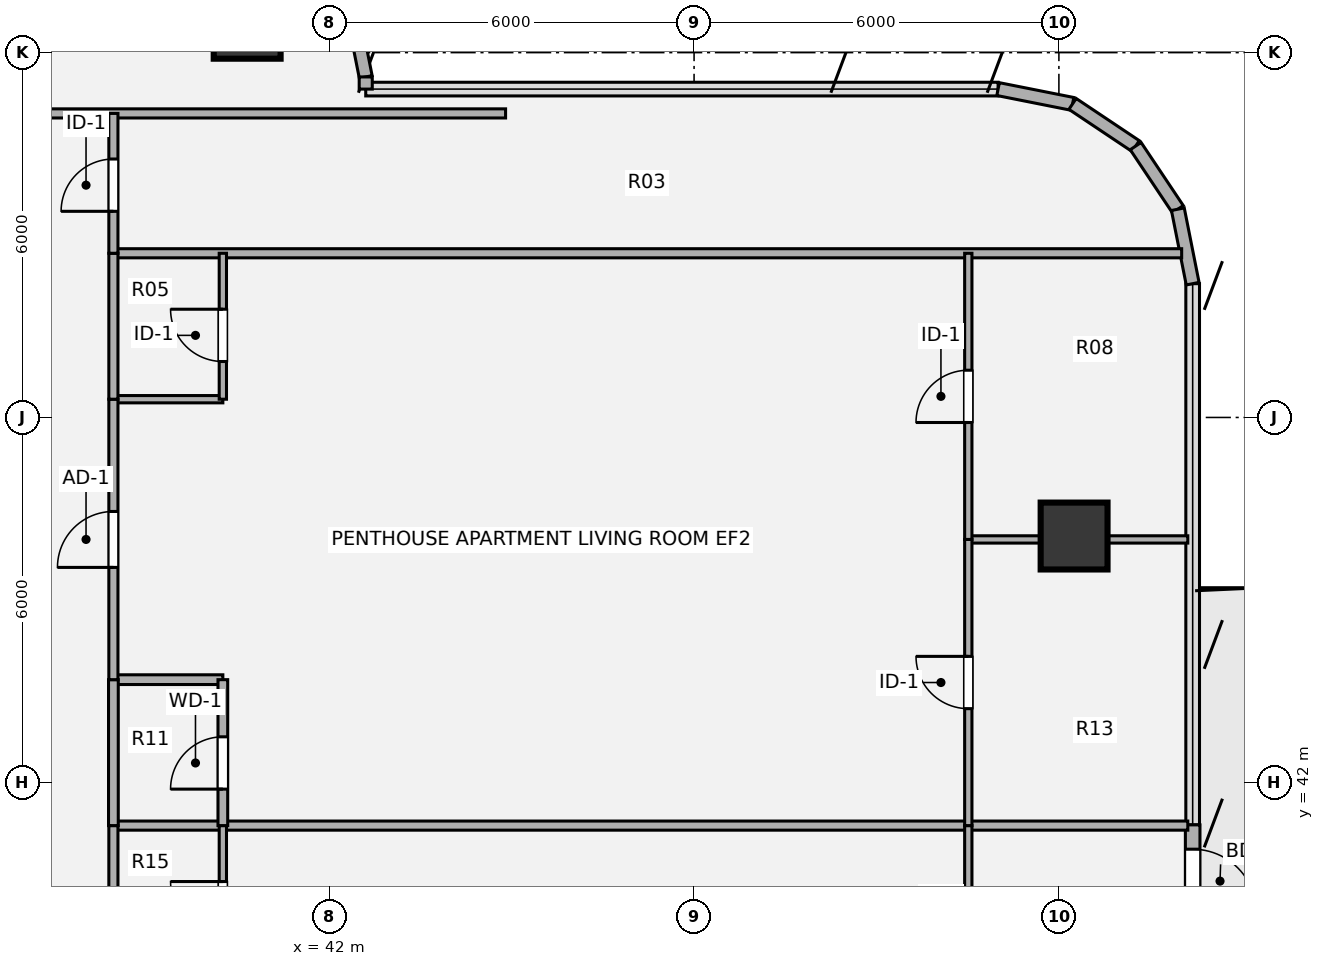
"""IFC4 building model, lengths in metres.
Left out: names, types, materials, properties, quantities, classifications, styles, units other than length and angle.
Written with IfcOpenShell. Run it as: python <this file> out.ifc"""

import sys

from ifc_helpers import new_model, si_unit, direction, frame, frame_2d, origin, origin_2d, place, context, subcontext, project, spatial, rectangle, hollow_circle, extrude, source, transform, mapped, element, fill, save


model = new_model("IFC4")
c1 = context("Model", 3, precision=1e-05, world=origin(), true_north=direction((0.0, 1.0)))
c2 = subcontext(c1, "Body", "Model", "MODEL_VIEW")
j1 = project(units=[si_unit("LENGTHUNIT", "METRE"), si_unit("PLANEANGLEUNIT", "RADIAN")], contexts=[c1])
p1 = place(None, origin())
s1 = spatial("IfcSite", under=j1, at=p1, CompositionType="ELEMENT")
p2 = place(p1, origin())
s2 = spatial("IfcBuilding", under=s1, at=p2, CompositionType="ELEMENT")
p3 = place(p2, frame((0.0, 0.0, 160.2)))
s3 = spatial("IfcBuildingStorey", under=s2, at=p3, CompositionType="ELEMENT", Elevation=160.2)
m1 = source(origin(), c2, "Body", "SweptSolid", [
    extrude(hollow_circle(Radius=0.55, WallThickness=0.04, at=origin_2d()), origin(), (0.0, 0.0, 1.0), 3.78),
])
for number, where, z_axis, x_axis in (
    (1, (54.25, 46.05, 0.0), (0.0, 0.0, 1.0), (1.0, 0.0, 0.0)),
    (2, (40.65, 54.45, 0.0), (0.0, 0.0, 1.0), (1.0, 0.0, 0.0)),
):
    element("IfcColumn", number, at=place(p3, frame(where, z_axis=z_axis, x_axis=x_axis)), inside=s3, PredefinedType="COLUMN", context=c2, shape_type="MappedRepresentation", body=[
        mapped(m1, transform((0.0, 0.0, 0.0), x_axis=(1.0, 0.0, 0.0), y_axis=(0.0, 1.0, 0.0), z_axis=(0.0, 0.0, 1.0), scale=1.0)),
    ])
p4 = place(p3, frame((42.387, 54.671, 0.0), z_axis=(0.0, 0.0, 1.0), x_axis=(0.195127417394, -0.980777900945, 0.0)))
e3 = element("IfcWall", 3, at=p4, inside=s3, PredefinedType="SOLIDWALL", context=c2, shape_type="SweptSolid", body=[
    extrude(rectangle(XDim=1.092, YDim=0.215, at=frame_2d((0.546, 0.0))), origin(), (0.0, 0.0, 1.0), 3.53),
])
p5 = place(p3, frame((42.6, 53.6, 0.0), z_axis=(0.0, 0.0, 1.0), x_axis=(0.0, -1.0, 0.0)))
e4 = element("IfcWall", 4, at=p5, inside=s3, PredefinedType="SOLIDWALL", context=c2, shape_type="SweptSolid", body=[
    extrude(rectangle(XDim=0.2, YDim=0.215, at=frame_2d((0.1, 0.0))), origin(), (0.0, 0.0, 1.0), 3.53),
])
for number, where, z_axis, x_axis in (
    (5, (53.0, 53.4, 0.0), (0.0, 0.0, 1.0), (0.981, -0.195, 0.0)),
    (6, (54.225, 53.156, 0.0), (0.0, 0.0, 1.0), (0.831, -0.556, 0.0)),
    (7, (55.263, 52.463, 0.0), (0.0, 0.0, 1.0), (0.556, -0.831, 0.0)),
    (8, (55.956, 51.425, 0.0), (0.0, 0.0, 1.0), (0.195, -0.981, 0.0)),
):
    element("IfcWall", number, at=place(p3, frame(where, z_axis=z_axis, x_axis=x_axis)), inside=s3, PredefinedType="SOLIDWALL", context=c2, shape_type="SweptSolid", body=[
        extrude(rectangle(XDim=1.249, YDim=0.215, at=frame_2d((0.624, 0.0))), origin(), (0.0, 0.0, 1.0), 3.53),
    ])
p6 = place(p3, frame((56.2, 41.3, 0.0), z_axis=(0.0, 0.0, 1.0), x_axis=(0.0, -1.0, 0.0)))
e9 = element("IfcWall", 9, at=p6, inside=s3, PredefinedType="SOLIDWALL", context=c2, shape_type="SweptSolid", body=[
    extrude(rectangle(XDim=3.6, YDim=0.24, at=frame_2d((1.8, 0.0))), origin(), (0.0, 0.0, 1.0), 3.53),
])
p7 = place(p6, frame((0.4, 0.0, 0.0)))
e10 = element("IfcOpeningElement", 10, at=p7, cuts=e9, PredefinedType="OPENING", context=c2, shape_type="SweptSolid", body=[
    extrude(rectangle(XDim=1.05, YDim=2.15, at=origin_2d()), frame((0.525, 0.13, 1.075), z_axis=(0.0, -1.0, 0.0), x_axis=(1.0, 0.0, 0.0)), (0.0, 0.0, 1.0), 0.26),
])
p8 = place(p6, frame((1.85, 0.0, 0.85)))
e11 = element("IfcOpeningElement", 11, at=p8, cuts=e9, PredefinedType="OPENING", context=c2, shape_type="SweptSolid", body=[
    extrude(rectangle(XDim=1.35, YDim=1.35, at=origin_2d()), frame((0.675, 0.13, 0.675), z_axis=(0.0, -1.0, 0.0), x_axis=(1.0, 0.0, 0.0)), (0.0, 0.0, 1.0), 0.26),
])
p9 = place(p3, frame((38.45, 41.288, 0.0), z_axis=(0.0, 0.0, 1.0), x_axis=(1.0, 0.0, 0.0)))
e12 = element("IfcWall", 12, at=p9, inside=s3, PredefinedType="PARTITIONING", context=c2, shape_type="SweptSolid", body=[
    extrude(rectangle(XDim=17.67, YDim=0.15, at=frame_2d((8.835, 0.0))), origin(), (0.0, 0.0, 1.0), 2.982),
])
p10 = place(p3, frame((38.45, 43.688, 0.0), z_axis=(0.0, 0.0, 1.0), x_axis=(1.0, 0.0, 0.0)))
e13 = element("IfcWall", 13, at=p10, inside=s3, PredefinedType="PLUMBINGWALL", context=c2, shape_type="SweptSolid", body=[
    extrude(rectangle(XDim=1.8, YDim=0.16, at=frame_2d((0.9, 0.0))), origin(), (0.0, 0.0, 1.0), 3.259),
])
p11 = place(p3, frame((52.51, 45.994, 0.0), z_axis=(0.0, 0.0, 1.0), x_axis=(1.0, 0.0, 0.0)))
e14 = element("IfcWall", 14, at=p11, inside=s3, PredefinedType="PARTITIONING", context=c2, shape_type="SweptSolid", body=[
    extrude(rectangle(XDim=3.61, YDim=0.12, at=frame_2d((1.805, 0.0))), origin(), (0.0, 0.0, 1.0), 2.903),
])
p12 = place(p3, frame((38.45, 48.3, 0.0), z_axis=(0.0, 0.0, 1.0), x_axis=(1.0, 0.0, 0.0)))
e15 = element("IfcWall", 15, at=p12, inside=s3, PredefinedType="PARTITIONING", context=c2, shape_type="SweptSolid", body=[
    extrude(rectangle(XDim=1.8, YDim=0.12, at=frame_2d((0.9, 0.0))), origin(), (0.0, 0.0, 1.0), 3.259),
])
p13 = place(p3, frame((38.45, 50.7, 0.0), z_axis=(0.0, 0.0, 1.0), x_axis=(1.0, 0.0, 0.0)))
e16 = element("IfcWall", 16, at=p13, inside=s3, PredefinedType="PARTITIONING", context=c2, shape_type="SweptSolid", body=[
    extrude(rectangle(XDim=17.569, YDim=0.15, at=frame_2d((8.785, 0.0))), origin(), (0.0, 0.0, 1.0), 3.308),
])
p14 = place(p3, frame((27.1, 53.0, 0.0), z_axis=(0.0, 0.0, 1.0), x_axis=(1.0, 0.0, 0.0)))
e17 = element("IfcWall", 17, at=p14, inside=s3, PredefinedType="PARTITIONING", context=c2, shape_type="SweptSolid", body=[
    extrude(rectangle(XDim=17.8, YDim=0.15, at=frame_2d((8.9, 0.0))), origin(), (0.0, 0.0, 1.0), 3.308),
])
p15 = place(p14, frame((8.375, 0.0, 0.0)))
e18 = element("IfcOpeningElement", 18, at=p15, cuts=e17, PredefinedType="OPENING", context=c2, shape_type="SweptSolid", body=[
    extrude(rectangle(XDim=1.05, YDim=2.1, at=origin_2d()), frame((0.525, 0.085, 1.05), z_axis=(0.0, -1.0, 0.0), x_axis=(1.0, 0.0, 0.0)), (0.0, 0.0, 1.0), 0.17),
])
p16 = place(p3, frame((38.45, 38.888, 0.0), z_axis=(0.0, 0.0, 1.0), x_axis=(0.0, 1.0, 0.0)))
e19 = element("IfcWall", 19, at=p16, inside=s3, PredefinedType="PARTITIONING", context=c2, shape_type="SweptSolid", body=[
    extrude(rectangle(XDim=2.4, YDim=0.15, at=frame_2d((1.2, 0.0))), origin(), (0.0, 0.0, 1.0), 3.5),
])
p17 = place(p3, frame((38.45, 41.288, 0.0), z_axis=(0.0, 0.0, 1.0), x_axis=(0.0, 1.0, 0.0)))
e20 = element("IfcWall", 20, at=p17, inside=s3, PredefinedType="PLUMBINGWALL", context=c2, shape_type="SweptSolid", body=[
    extrude(rectangle(XDim=2.4, YDim=0.16, at=frame_2d((1.2, 0.0))), origin(), (0.0, 0.0, 1.0), 3.5),
])
p18 = place(p3, frame((38.45, 43.688, 0.0), z_axis=(0.0, 0.0, 1.0), x_axis=(0.0, 1.0, 0.0)))
e21 = element("IfcWall", 21, at=p18, inside=s3, PredefinedType="PARTITIONING", context=c2, shape_type="SweptSolid", body=[
    extrude(rectangle(XDim=4.612, YDim=0.15, at=frame_2d((2.306, 0.0))), origin(), (0.0, 0.0, 1.0), 3.5),
])
p19 = place(p18, frame((1.846, 0.0, 0.0)))
e22 = element("IfcOpeningElement", 22, at=p19, cuts=e21, PredefinedType="OPENING", context=c2, shape_type="SweptSolid", body=[
    extrude(rectangle(XDim=0.92, YDim=2.1, at=origin_2d()), frame((0.46, 0.085, 1.05), z_axis=(0.0, -1.0, 0.0), x_axis=(1.0, 0.0, 0.0)), (0.0, 0.0, 1.0), 0.17),
])
p20 = place(p3, frame((38.45, 48.3, 0.0), z_axis=(0.0, 0.0, 1.0), x_axis=(0.0, 1.0, 0.0)))
e23 = element("IfcWall", 23, at=p20, inside=s3, PredefinedType="PARTITIONING", context=c2, shape_type="SweptSolid", body=[
    extrude(rectangle(XDim=2.4, YDim=0.15, at=frame_2d((1.2, 0.0))), origin(), (0.0, 0.0, 1.0), 3.5),
])
p21 = place(p3, frame((38.45, 50.7, 0.0), z_axis=(0.0, 0.0, 1.0), x_axis=(0.0, 1.0, 0.0)))
e24 = element("IfcWall", 24, at=p21, inside=s3, PredefinedType="PARTITIONING", context=c2, shape_type="SweptSolid", body=[
    extrude(rectangle(XDim=2.3, YDim=0.15, at=frame_2d((1.15, 0.0))), origin(), (0.0, 0.0, 1.0), 3.5),
])
p22 = place(p21, frame((0.69, 0.0, 0.0)))
e25 = element("IfcOpeningElement", 25, at=p22, cuts=e24, PredefinedType="OPENING", context=c2, shape_type="SweptSolid", body=[
    extrude(rectangle(XDim=0.86, YDim=2.1, at=origin_2d()), frame((0.43, 0.085, 1.05), z_axis=(0.0, -1.0, 0.0), x_axis=(1.0, 0.0, 0.0)), (0.0, 0.0, 1.0), 0.17),
])
p23 = place(p3, frame((40.25, 38.888, 0.0), z_axis=(0.0, 0.0, 1.0), x_axis=(0.0, 1.0, 0.0)))
e26 = element("IfcWall", 26, at=p23, inside=s3, PredefinedType="PARTITIONING", context=c2, shape_type="SweptSolid", body=[
    extrude(rectangle(XDim=2.4, YDim=0.12, at=frame_2d((1.2, 0.0))), origin(), (0.0, 0.0, 1.0), 3.5),
])
p24 = place(p23, frame((0.62, 0.0, 0.0)))
e27 = element("IfcOpeningElement", 27, at=p24, cuts=e26, PredefinedType="OPENING", context=c2, shape_type="SweptSolid", body=[
    extrude(rectangle(XDim=0.86, YDim=2.1, at=origin_2d()), frame((0.43, 0.07, 1.05), z_axis=(0.0, -1.0, 0.0), x_axis=(1.0, 0.0, 0.0)), (0.0, 0.0, 1.0), 0.14),
])
p25 = place(p3, frame((40.25, 41.288, 0.0), z_axis=(0.0, 0.0, 1.0), x_axis=(0.0, 1.0, 0.0)))
e28 = element("IfcWall", 28, at=p25, inside=s3, PredefinedType="PLUMBINGWALL", context=c2, shape_type="SweptSolid", body=[
    extrude(rectangle(XDim=2.4, YDim=0.16, at=frame_2d((1.2, 0.0))), origin(), (0.0, 0.0, 1.0), 3.5),
])
p26 = place(p25, frame((0.6, 0.0, 0.0)))
e29 = element("IfcOpeningElement", 29, at=p26, cuts=e28, PredefinedType="OPENING", context=c2, shape_type="SweptSolid", body=[
    extrude(rectangle(XDim=0.86, YDim=2.1, at=origin_2d()), frame((0.43, 0.09, 1.05), z_axis=(0.0, -1.0, 0.0), x_axis=(1.0, 0.0, 0.0)), (0.0, 0.0, 1.0), 0.18),
])
p27 = place(p3, frame((40.25, 48.3, 0.0), z_axis=(0.0, 0.0, 1.0), x_axis=(0.0, 1.0, 0.0)))
e30 = element("IfcWall", 30, at=p27, inside=s3, PredefinedType="PARTITIONING", context=c2, shape_type="SweptSolid", body=[
    extrude(rectangle(XDim=2.4, YDim=0.12, at=frame_2d((1.2, 0.0))), origin(), (0.0, 0.0, 1.0), 3.5),
])
p28 = place(p27, frame((0.62, 0.0, 0.0)))
e31 = element("IfcOpeningElement", 31, at=p28, cuts=e30, PredefinedType="OPENING", context=c2, shape_type="SweptSolid", body=[
    extrude(rectangle(XDim=0.86, YDim=2.1, at=origin_2d()), frame((0.43, 0.07, 1.05), z_axis=(0.0, -1.0, 0.0), x_axis=(1.0, 0.0, 0.0)), (0.0, 0.0, 1.0), 0.14),
])
p29 = place(p3, frame((52.51, 36.944, 0.0), z_axis=(0.0, 0.0, 1.0), x_axis=(0.0, 1.0, 0.0)))
e32 = element("IfcWall", 32, at=p29, inside=s3, PredefinedType="PARTITIONING", context=c2, shape_type="SweptSolid", body=[
    extrude(rectangle(XDim=4.344, YDim=0.12, at=frame_2d((2.172, 0.0))), origin(), (0.0, 0.0, 1.0), 3.5),
])
p30 = place(p29, frame((1.742, 0.0, 0.0)))
e33 = element("IfcOpeningElement", 33, at=p30, cuts=e32, PredefinedType="OPENING", context=c2, shape_type="SweptSolid", body=[
    extrude(rectangle(XDim=0.86, YDim=2.1, at=origin_2d()), frame((0.43, 0.07, 1.05), z_axis=(0.0, -1.0, 0.0), x_axis=(1.0, 0.0, 0.0)), (0.0, 0.0, 1.0), 0.14),
])
p31 = place(p3, frame((52.51, 41.288, 0.0), z_axis=(0.0, 0.0, 1.0), x_axis=(0.0, 1.0, 0.0)))
e34 = element("IfcWall", 34, at=p31, inside=s3, PredefinedType="PARTITIONING", context=c2, shape_type="SweptSolid", body=[
    extrude(rectangle(XDim=4.706, YDim=0.12, at=frame_2d((2.353, 0.0))), origin(), (0.0, 0.0, 1.0), 3.5),
])
p32 = place(p31, frame((1.923, 0.0, 0.0)))
e35 = element("IfcOpeningElement", 35, at=p32, cuts=e34, PredefinedType="OPENING", context=c2, shape_type="SweptSolid", body=[
    extrude(rectangle(XDim=0.86, YDim=2.1, at=origin_2d()), frame((0.43, 0.07, 1.05), z_axis=(0.0, -1.0, 0.0), x_axis=(1.0, 0.0, 0.0)), (0.0, 0.0, 1.0), 0.14),
])
p33 = place(p3, frame((52.51, 45.994, 0.0), z_axis=(0.0, 0.0, 1.0), x_axis=(0.0, 1.0, 0.0)))
e36 = element("IfcWall", 36, at=p33, inside=s3, PredefinedType="PARTITIONING", context=c2, shape_type="SweptSolid", body=[
    extrude(rectangle(XDim=4.706, YDim=0.12, at=frame_2d((2.353, 0.0))), origin(), (0.0, 0.0, 1.0), 3.5),
])
p34 = place(p33, frame((1.923, 0.0, 0.0)))
e37 = element("IfcOpeningElement", 37, at=p34, cuts=e36, PredefinedType="OPENING", context=c2, shape_type="SweptSolid", body=[
    extrude(rectangle(XDim=0.86, YDim=2.1, at=origin_2d()), frame((0.43, 0.07, 1.05), z_axis=(0.0, -1.0, 0.0), x_axis=(1.0, 0.0, 0.0)), (0.0, 0.0, 1.0), 0.14),
])
m2 = source(origin(), c2, "Body", "SweptSolid", [
    extrude(rectangle(XDim=1.05, YDim=2.15, at=origin_2d()), frame((0.525, 0.025, 1.075), z_axis=(0.0, -1.0, 0.0), x_axis=(1.0, 0.0, 0.0)), (0.0, 0.0, 1.0), 0.05),
])
p35 = place(p7, origin())
e38 = element("IfcDoor", 38, at=p35, inside=s3, OperationType="SINGLE_SWING_RIGHT", PredefinedType="DOOR", context=c2, shape_type="MappedRepresentation", body=[
    mapped(m2, transform((0.0, 0.0, 0.0), x_axis=(1.0, 0.0, 0.0), y_axis=(0.0, 1.0, 0.0), z_axis=(0.0, 0.0, 1.0), scale=1.0)),
])
fill(e10, e38)
m3 = source(origin(), c2, "Body", "SweptSolid", [
    extrude(rectangle(XDim=0.92, YDim=2.1, at=origin_2d()), frame((0.46, 0.025, 1.05), z_axis=(0.0, -1.0, 0.0), x_axis=(1.0, 0.0, 0.0)), (0.0, 0.0, 1.0), 0.05),
])
p36 = place(p19, origin())
e39 = element("IfcDoor", 39, at=p36, inside=s3, OperationType="SINGLE_SWING_LEFT", PredefinedType="DOOR", context=c2, shape_type="MappedRepresentation", body=[
    mapped(m3, transform((0.0, 0.0, 0.0), x_axis=(1.0, 0.0, 0.0), y_axis=(0.0, 1.0, 0.0), z_axis=(0.0, 0.0, 1.0), scale=1.0)),
])
fill(e22, e39)
m4 = source(origin(), c2, "Body", "SweptSolid", [
    extrude(rectangle(XDim=0.86, YDim=2.1, at=origin_2d()), frame((0.43, 0.025, 1.05), z_axis=(0.0, -1.0, 0.0), x_axis=(1.0, 0.0, 0.0)), (0.0, 0.0, 1.0), 0.05),
])
p37 = place(p22, origin())
e40 = element("IfcDoor", 40, at=p37, inside=s3, OperationType="SINGLE_SWING_LEFT", PredefinedType="DOOR", context=c2, shape_type="MappedRepresentation", body=[
    mapped(m4, transform((0.0, 0.0, 0.0), x_axis=(1.0, 0.0, 0.0), y_axis=(0.0, 1.0, 0.0), z_axis=(0.0, 0.0, 1.0), scale=1.0)),
])
fill(e25, e40)
p38 = place(p24, origin())
e41 = element("IfcDoor", 41, at=p38, inside=s3, OperationType="SINGLE_SWING_RIGHT", PredefinedType="DOOR", context=c2, shape_type="MappedRepresentation", body=[
    mapped(m4, transform((0.0, 0.0, 0.0), x_axis=(1.0, 0.0, 0.0), y_axis=(0.0, 1.0, 0.0), z_axis=(0.0, 0.0, 1.0), scale=1.0)),
])
fill(e27, e41)
m5 = source(origin(), c2, "Body", "SweptSolid", [
    extrude(rectangle(XDim=0.86, YDim=2.1, at=origin_2d()), frame((0.43, 0.025, 1.05), z_axis=(0.0, -1.0, 0.0), x_axis=(1.0, 0.0, 0.0)), (0.0, 0.0, 1.0), 0.05),
])
p39 = place(p26, origin())
e42 = element("IfcDoor", 42, at=p39, inside=s3, OperationType="SINGLE_SWING_LEFT", PredefinedType="DOOR", context=c2, shape_type="MappedRepresentation", body=[
    mapped(m5, transform((0.0, 0.0, 0.0), x_axis=(1.0, 0.0, 0.0), y_axis=(0.0, 1.0, 0.0), z_axis=(0.0, 0.0, 1.0), scale=1.0)),
])
fill(e29, e42)
p40 = place(p28, origin())
e43 = element("IfcDoor", 43, at=p40, inside=s3, OperationType="SINGLE_SWING_RIGHT", PredefinedType="DOOR", context=c2, shape_type="MappedRepresentation", body=[
    mapped(m4, transform((0.0, 0.0, 0.0), x_axis=(1.0, 0.0, 0.0), y_axis=(0.0, 1.0, 0.0), z_axis=(0.0, 0.0, 1.0), scale=1.0)),
])
fill(e31, e43)
p41 = place(p32, origin())
e44 = element("IfcDoor", 44, at=p41, inside=s3, OperationType="SINGLE_SWING_RIGHT", PredefinedType="DOOR", context=c2, shape_type="MappedRepresentation", body=[
    mapped(m4, transform((0.0, 0.0, 0.0), x_axis=(1.0, 0.0, 0.0), y_axis=(0.0, 1.0, 0.0), z_axis=(0.0, 0.0, 1.0), scale=1.0)),
])
fill(e35, e44)
p42 = place(p34, origin())
e45 = element("IfcDoor", 45, at=p42, inside=s3, OperationType="SINGLE_SWING_LEFT", PredefinedType="DOOR", context=c2, shape_type="MappedRepresentation", body=[
    mapped(m4, transform((0.0, 0.0, 0.0), x_axis=(1.0, 0.0, 0.0), y_axis=(0.0, 1.0, 0.0), z_axis=(0.0, 0.0, 1.0), scale=1.0)),
])
fill(e37, e45)
save(model, sys.argv[1])
